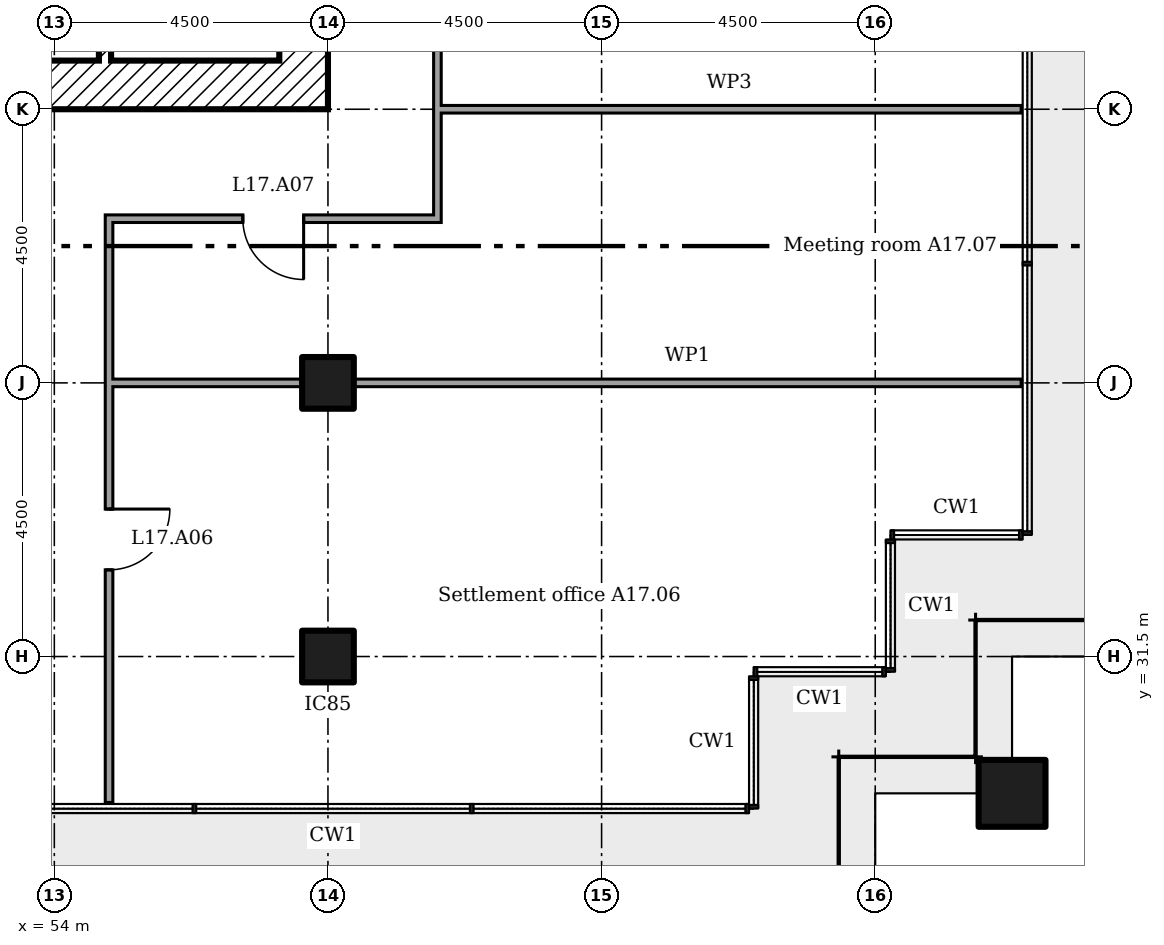
"""IFC4 building model, lengths in metres.
Left out: names, types, materials, properties, quantities, classifications, styles, units other than length and angle.
Written with IfcOpenShell. Run it as: python <this file> out.ifc"""

import sys

from ifc_helpers import new_model, si_unit, direction, frame, frame_2d, origin, origin_2d, place, context, subcontext, project, spatial, rectangle, extrude, element, fill, save


model = new_model("IFC4")
c1 = context("Model", 3, precision=1e-05, world=origin(), true_north=direction((0.0, 1.0)))
c2 = subcontext(c1, "Body", "Model", "MODEL_VIEW")
j1 = project(units=[si_unit("LENGTHUNIT", "METRE"), si_unit("PLANEANGLEUNIT", "RADIAN")], contexts=[c1])
p1 = place(None, origin())
s1 = spatial("IfcSite", under=j1, at=p1, CompositionType="ELEMENT")
p2 = place(p1, origin())
s2 = spatial("IfcBuilding", under=s1, at=p2, CompositionType="ELEMENT")
p3 = place(p2, frame((0.0, 0.0, 72.6)))
s3 = spatial("IfcBuildingStorey", under=s2, at=p3, CompositionType="ELEMENT", Elevation=72.6)
p4 = place(p3, frame((69.75, 29.25, 0.0)))
e1 = element("IfcColumn", 1, at=p4, inside=s3, PredefinedType="COLUMN", context=c2, shape_type="SweptSolid", body=[
    extrude(rectangle(XDim=1.1, YDim=1.1, at=origin_2d()), origin(), (0.0, 0.0, 1.0), 3.6),
])
for number, where in (
    (2, (58.5, 31.5, 0.0)),
    (3, (58.5, 36.0, 0.0)),
):
    element("IfcColumn", number, at=place(p3, frame(where)), inside=s3, PredefinedType="COLUMN", context=c2, shape_type="SweptSolid", body=[
        extrude(rectangle(XDim=0.85, YDim=0.85, at=origin_2d()), origin(), (0.0, 0.0, 1.0), 3.6),
    ])
p5 = place(p3, frame((58.1, 40.5, 0.0), z_axis=(0.0, 0.0, 1.0), x_axis=(0.0, 1.0, 0.0)))
e4 = element("IfcWall", 4, at=p5, inside=s3, PredefinedType="SHEAR", context=c2, shape_type="SweptSolid", body=[
    extrude(rectangle(XDim=18.0, YDim=0.8, at=frame_2d((9.0, 0.0))), origin(), (0.0, 0.0, 1.0), 3.35),
])
p6 = place(p5, frame((13.15, 0.0, 0.0)))
e5 = element("IfcOpeningElement", 5, at=p6, cuts=e4, PredefinedType="OPENING", context=c2, shape_type="SweptSolid", body=[
    extrude(rectangle(XDim=1.2, YDim=2.1, at=frame_2d((0.6, 1.05))), frame((0.0, 0.41, 0.0), z_axis=(0.0, -1.0, 0.0), x_axis=(1.0, 0.0, 0.0)), (0.0, 0.0, 1.0), 0.82),
])
p7 = place(p5, frame((3.9, 0.0, 0.0)))
e6 = element("IfcOpeningElement", 6, at=p7, cuts=e4, PredefinedType="OPENING", context=c2, shape_type="SweptSolid", body=[
    extrude(rectangle(XDim=1.8, YDim=2.1, at=frame_2d((0.9, 1.05))), frame((0.0, 0.41, 0.0), z_axis=(0.0, -1.0, 0.0), x_axis=(1.0, 0.0, 0.0)), (0.0, 0.0, 1.0), 0.82),
])
p8 = place(p5, frame((11.525, 0.0, 0.0)))
e7 = element("IfcOpeningElement", 7, at=p8, cuts=e4, PredefinedType="OPENING", context=c2, shape_type="SweptSolid", body=[
    extrude(rectangle(XDim=1.0, YDim=2.1, at=frame_2d((0.5, 1.05))), frame((0.0, 0.41, 0.0), z_axis=(0.0, -1.0, 0.0), x_axis=(1.0, 0.0, 0.0)), (0.0, 0.0, 1.0), 0.82),
])
p9 = place(p3, frame((41.3, 40.9, 0.0)))
e8 = element("IfcWall", 8, at=p9, inside=s3, PredefinedType="SHEAR", context=c2, shape_type="SweptSolid", body=[
    extrude(rectangle(XDim=16.4, YDim=0.8, at=frame_2d((8.2, 0.0))), origin(), (0.0, 0.0, 1.0), 3.35),
])
p10 = place(p3, frame((54.833, 41.3, 0.0), z_axis=(0.0, 0.0, 1.0), x_axis=(0.0, 1.0, 0.0)))
e9 = element("IfcWall", 9, at=p10, inside=s3, PredefinedType="SHEAR", context=c2, shape_type="SweptSolid", body=[
    extrude(rectangle(XDim=2.5, YDim=0.2, at=frame_2d((1.25, 0.0))), origin(), (0.0, 0.0, 1.0), 3.35),
])
p11 = place(p3, frame((54.9, 36.0, 0.0)))
e10 = element("IfcWall", 10, at=p11, inside=s3, PredefinedType="PARTITIONING", context=c2, shape_type="SweptSolid", body=[
    extrude(rectangle(XDim=3.175, YDim=0.125, at=frame_2d((1.587, 0.0))), origin(), (0.0, 0.0, 1.0), 3.45),
])
p12 = place(p3, frame((58.925, 36.0, 0.0)))
e11 = element("IfcWall", 11, at=p12, inside=s3, PredefinedType="PARTITIONING", context=c2, shape_type="SweptSolid", body=[
    extrude(rectangle(XDim=10.975, YDim=0.125, at=frame_2d((5.487, 0.0))), origin(), (0.0, 0.0, 1.0), 2.766),
])
p13 = place(p3, frame((54.837, 38.7, 0.0)))
e12 = element("IfcWall", 12, at=p13, inside=s3, PredefinedType="PARTITIONING", context=c2, shape_type="SweptSolid", body=[
    extrude(rectangle(XDim=5.525, YDim=0.125, at=frame_2d((2.763, 0.0))), origin(), (0.0, 0.0, 1.0), 3.45),
])
p14 = place(p13, frame((2.262, 0.0, 0.0)))
e13 = element("IfcOpeningElement", 13, at=p14, cuts=e12, PredefinedType="OPENING", context=c2, shape_type="SweptSolid", body=[
    extrude(rectangle(XDim=1.0, YDim=2.1, at=frame_2d((0.5, 1.05))), frame((0.0, 0.073, 0.0), z_axis=(0.0, -1.0, 0.0), x_axis=(1.0, 0.0, 0.0)), (0.0, 0.0, 1.0), 0.145),
])
p15 = place(p3, frame((60.3, 40.5, 0.0)))
e14 = element("IfcWall", 14, at=p15, inside=s3, PredefinedType="MOVABLE", context=c2, shape_type="SweptSolid", body=[
    extrude(rectangle(XDim=9.6, YDim=0.125, at=frame_2d((4.8, 0.0))), origin(), (0.0, 0.0, 1.0), 2.766),
])
p16 = place(p3, frame((54.9, 29.1, 0.0), z_axis=(0.0, 0.0, 1.0), x_axis=(0.0, 1.0, 0.0)))
e15 = element("IfcWall", 15, at=p16, inside=s3, PredefinedType="PARTITIONING", context=c2, shape_type="SweptSolid", body=[
    extrude(rectangle(XDim=9.537, YDim=0.125, at=frame_2d((4.769, 0.0))), origin(), (0.0, 0.0, 1.0), 3.45),
])
p17 = place(p16, frame((3.825, 0.0, 0.0)))
e16 = element("IfcOpeningElement", 16, at=p17, cuts=e15, PredefinedType="OPENING", context=c2, shape_type="SweptSolid", body=[
    extrude(rectangle(XDim=1.0, YDim=2.1, at=frame_2d((0.5, 1.05))), frame((0.0, 0.073, 0.0), z_axis=(0.0, -1.0, 0.0), x_axis=(1.0, 0.0, 0.0)), (0.0, 0.0, 1.0), 0.145),
])
p18 = place(p3, frame((60.3, 38.762, 0.0), z_axis=(0.0, 0.0, 1.0), x_axis=(0.0, 1.0, 0.0)))
e17 = element("IfcWall", 17, at=p18, inside=s3, PredefinedType="PARTITIONING", context=c2, shape_type="SweptSolid", body=[
    extrude(rectangle(XDim=21.475, YDim=0.125, at=frame_2d((10.738, 0.0))), origin(), (0.0, 0.0, 1.0), 3.45),
])
p19 = place(p18, frame((3.032, 0.0, 0.0)))
e18 = element("IfcOpeningElement", 18, at=p19, cuts=e17, PredefinedType="OPENING", context=c2, shape_type="SweptSolid", body=[
    extrude(rectangle(XDim=1.0, YDim=2.1, at=frame_2d((0.5, 1.05))), frame((0.0, 0.073, 0.0), z_axis=(0.0, -1.0, 0.0), x_axis=(1.0, 0.0, 0.0)), (0.0, 0.0, 1.0), 0.145),
])
p20 = place(p18, frame((8.442, 0.0, 0.0)))
e19 = element("IfcOpeningElement", 19, at=p20, cuts=e17, PredefinedType="OPENING", context=c2, shape_type="SweptSolid", body=[
    extrude(rectangle(XDim=1.0, YDim=2.1, at=frame_2d((0.5, 1.05))), frame((0.0, 0.073, 0.0), z_axis=(0.0, -1.0, 0.0), x_axis=(1.0, 0.0, 0.0)), (0.0, 0.0, 1.0), 0.145),
])
p21 = place(p18, frame((12.488, 0.0, 0.0)))
e20 = element("IfcOpeningElement", 20, at=p21, cuts=e17, PredefinedType="OPENING", context=c2, shape_type="SweptSolid", body=[
    extrude(rectangle(XDim=1.0, YDim=2.1, at=frame_2d((0.5, 1.05))), frame((0.0, 0.073, 0.0), z_axis=(0.0, -1.0, 0.0), x_axis=(1.0, 0.0, 0.0)), (0.0, 0.0, 1.0), 0.145),
])
p22 = place(p18, frame((16.532, 0.0, 0.0)))
e21 = element("IfcOpeningElement", 21, at=p22, cuts=e17, PredefinedType="OPENING", context=c2, shape_type="SweptSolid", body=[
    extrude(rectangle(XDim=1.0, YDim=2.1, at=frame_2d((0.5, 1.05))), frame((0.0, 0.073, 0.0), z_axis=(0.0, -1.0, 0.0), x_axis=(1.0, 0.0, 0.0)), (0.0, 0.0, 1.0), 0.145),
])
p23 = place(p18, frame((20.258, 0.0, 0.0)))
e22 = element("IfcOpeningElement", 22, at=p23, cuts=e17, PredefinedType="OPENING", context=c2, shape_type="SweptSolid", body=[
    extrude(rectangle(XDim=0.9, YDim=2.1, at=frame_2d((0.45, 1.05))), frame((0.0, 0.073, 0.0), z_axis=(0.0, -1.0, 0.0), x_axis=(1.0, 0.0, 0.0)), (0.0, 0.0, 1.0), 0.145),
])
p24 = place(p17, frame((1.0, 0.0, 0.0), x_axis=(-1.0, 0.0, 0.0)))
e23 = element("IfcDoor", 23, at=p24, inside=s3, OperationType="SINGLE_SWING_RIGHT", PredefinedType="DOOR", context=c2, shape_type="SweptSolid", body=[
    extrude(rectangle(XDim=1.0, YDim=2.1, at=frame_2d((0.5, 1.05))), frame((0.0, 0.025, 0.0), z_axis=(0.0, -1.0, 0.0), x_axis=(1.0, 0.0, 0.0)), (0.0, 0.0, 1.0), 0.05),
])
fill(e16, e23)
p25 = place(p14, frame((1.0, 0.0, 0.0), x_axis=(-1.0, 0.0, 0.0)))
e24 = element("IfcDoor", 24, at=p25, inside=s3, OperationType="SINGLE_SWING_RIGHT", PredefinedType="DOOR", context=c2, shape_type="SweptSolid", body=[
    extrude(rectangle(XDim=1.0, YDim=2.1, at=frame_2d((0.5, 1.05))), frame((0.0, 0.025, 0.0), z_axis=(0.0, -1.0, 0.0), x_axis=(1.0, 0.0, 0.0)), (0.0, 0.0, 1.0), 0.05),
])
fill(e13, e24)
save(model, sys.argv[1])
